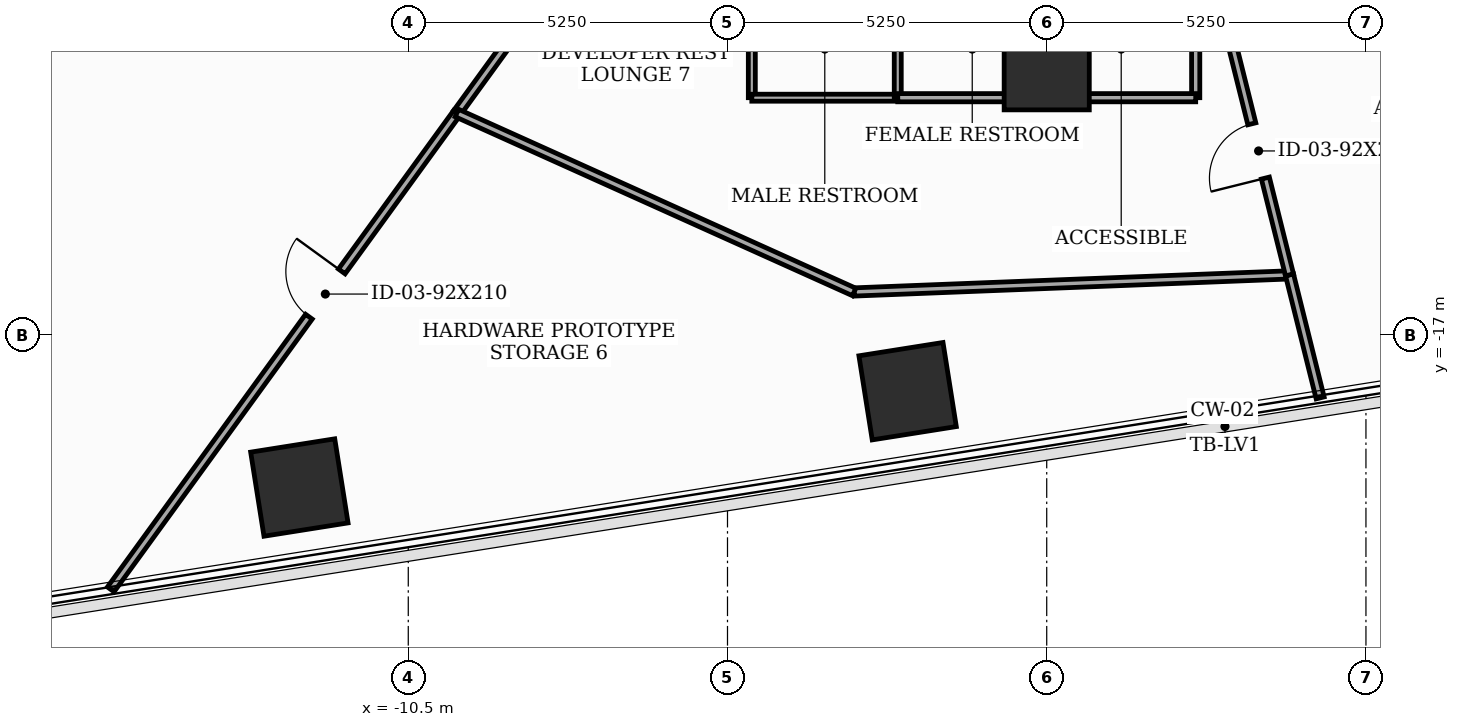
"""IFC4 building model, lengths in metres.
Left out: names, types, materials, properties, quantities, classifications, styles, units other than length and angle.
Written with IfcOpenShell. Run it as: python <this file> out.ifc"""

import sys

from ifc_helpers import new_model, si_unit, direction, frame, frame_2d, origin, origin_2d, place, context, subcontext, project, spatial, rectangle, extrude, element, fill, save


model = new_model("IFC4")
c1 = context("Model", 3, precision=1e-05, world=origin(), true_north=direction((0.0, 1.0)))
c2 = subcontext(c1, "Body", "Model", "MODEL_VIEW")
j1 = project(units=[si_unit("LENGTHUNIT", "METRE"), si_unit("PLANEANGLEUNIT", "RADIAN")], contexts=[c1])
p1 = place(None, origin())
s1 = spatial("IfcSite", under=j1, at=p1, CompositionType="ELEMENT")
p2 = place(p1, origin())
s2 = spatial("IfcBuilding", under=s1, at=p2, CompositionType="ELEMENT")
p3 = place(p2, frame((0.0, 0.0, 59.3)))
s3 = spatial("IfcBuildingStorey", under=s2, at=p3, CompositionType="ELEMENT", Elevation=59.3)
for number, where, z_axis, x_axis in (
    (1, (0.0, -12.6, 0.0), (0.0, 0.0, 1.0), (1.0, 0.0, 0.0)),
    (2, (-12.291, -19.511, 0.0), (0.0, 0.0, 1.0), (0.988, 0.156, 0.0)),
    (3, (-2.288, -17.927, 0.0), (0.0, 0.0, 1.0), (0.988, 0.156, 0.0)),
):
    element("IfcColumn", number, at=place(p3, frame(where, z_axis=z_axis, x_axis=x_axis)), inside=s3, PredefinedType="COLUMN", context=c2, shape_type="SweptSolid", body=[
        extrude(rectangle(XDim=1.4, YDim=1.4, at=origin_2d()), origin(), (0.0, 0.0, 1.0), 3.7),
    ])
p4 = place(p3, frame((-15.393, -21.187, 0.0), z_axis=(0.0, 0.0, 1.0), x_axis=(0.587736917223, 0.809052109653, 0.0)))
e4 = element("IfcWall", 4, at=p4, inside=s3, PredefinedType="PARTITIONING", context=c2, shape_type="SweptSolid", body=[
    extrude(rectangle(XDim=9.684, YDim=0.135, at=frame_2d((4.842, 0.0))), origin(), (0.0, 0.0, 1.0), 2.935),
])
p5 = place(p4, frame((5.544, 0.0, 0.0)))
e5 = element("IfcOpeningElement", 5, at=p5, cuts=e4, PredefinedType="OPENING", context=c2, shape_type="SweptSolid", body=[
    extrude(rectangle(XDim=0.92, YDim=2.1, at=frame_2d((0.46, 1.05))), frame((0.0, 0.077, 0.0), z_axis=(0.0, -1.0, 0.0), x_axis=(1.0, 0.0, 0.0)), (0.0, 0.0, 1.0), 0.155),
])
p6 = place(p3, frame((-9.701, -13.352, 0.0), z_axis=(0.0, 0.0, 1.0), x_axis=(0.587719574609, 0.809064707932, 0.0)))
e6 = element("IfcWall", 6, at=p6, inside=s3, PredefinedType="PARTITIONING", context=c2, shape_type="SweptSolid", body=[
    extrude(rectangle(XDim=3.34, YDim=0.135, at=frame_2d((1.67, 0.0))), origin(), (0.0, 0.0, 1.0), 3.5),
])
p7 = place(p3, frame((3.993, -16.014, 0.0), z_axis=(0.0, 0.0, 1.0), x_axis=(-0.999230720769, -0.039216918185, 0.0)))
e7 = element("IfcWall", 7, at=p7, inside=s3, PredefinedType="PARTITIONING", context=c2, shape_type="SweptSolid", body=[
    extrude(rectangle(XDim=7.166, YDim=0.135, at=frame_2d((3.583, 0.0))), origin(), (0.0, 0.0, 1.0), 2.785),
])
p8 = place(p3, frame((-3.167, -16.295, 0.0), z_axis=(0.0, 0.0, 1.0), x_axis=(-0.911785675506, 0.410666387645, 0.0)))
e8 = element("IfcWall", 8, at=p8, inside=s3, PredefinedType="PARTITIONING", context=c2, shape_type="SweptSolid", body=[
    extrude(rectangle(XDim=7.166, YDim=0.135, at=frame_2d((3.583, 0.0))), origin(), (0.0, 0.0, 1.0), 2.785),
])
p9 = place(p3, frame((4.497, -18.037, 0.0), z_axis=(0.0, 0.0, 1.0), x_axis=(-0.24157117672, 0.970383102995, 0.0)))
e9 = element("IfcWall", 9, at=p9, inside=s3, PredefinedType="PARTITIONING", context=c2, shape_type="SweptSolid", body=[
    extrude(rectangle(XDim=2.085, YDim=0.135, at=frame_2d((1.042, 0.0))), origin(), (0.0, 0.0, 1.0), 2.935),
])
p10 = place(p3, frame((-4.85, -10.65, 0.0), z_axis=(0.0, 0.0, 1.0), x_axis=(0.0, -1.0, 0.0)))
e10 = element("IfcWall", 10, at=p10, inside=s3, PredefinedType="PARTITIONING", context=c2, shape_type="SweptSolid", body=[
    extrude(rectangle(XDim=2.45, YDim=0.115, at=frame_2d((1.225, 0.0))), origin(), (0.0, 0.0, 1.0), 2.785),
])
p11 = place(p3, frame((-4.85, -13.1, 0.0), z_axis=(0.0, 0.0, 1.0), x_axis=(1.0, 0.0, 0.0)))
e11 = element("IfcWall", 11, at=p11, inside=s3, PredefinedType="PARTITIONING", context=c2, shape_type="SweptSolid", body=[
    extrude(rectangle(XDim=2.4, YDim=0.115, at=frame_2d((1.2, 0.0))), origin(), (0.0, 0.0, 1.0), 3.5),
])
p12 = place(p3, frame((-2.45, -13.1, 0.0), z_axis=(0.0, 0.0, 1.0), x_axis=(0.0, 1.0, 0.0)))
e12 = element("IfcWall", 12, at=p12, inside=s3, PredefinedType="PARTITIONING", context=c2, shape_type="SweptSolid", body=[
    extrude(rectangle(XDim=2.45, YDim=0.115, at=frame_2d((1.225, 0.0))), origin(), (0.0, 0.0, 1.0), 2.785),
])
p13 = place(p3, frame((0.0, -13.1, 0.0), z_axis=(0.0, 0.0, 1.0), x_axis=(-1.0, 0.0, 0.0)))
e13 = element("IfcWall", 13, at=p13, inside=s3, PredefinedType="PARTITIONING", context=c2, shape_type="SweptSolid", body=[
    extrude(rectangle(XDim=2.45, YDim=0.135, at=frame_2d((1.225, 0.0))), origin(), (0.0, 0.0, 1.0), 2.785),
])
p14 = place(p3, frame((2.45, -10.65, 0.0), z_axis=(0.0, 0.0, 1.0), x_axis=(0.0, -1.0, 0.0)))
e14 = element("IfcWall", 14, at=p14, inside=s3, PredefinedType="PARTITIONING", context=c2, shape_type="SweptSolid", body=[
    extrude(rectangle(XDim=2.45, YDim=0.135, at=frame_2d((1.225, 0.0))), origin(), (0.0, 0.0, 1.0), 2.785),
])
p15 = place(p3, frame((2.45, -13.1, 0.0), z_axis=(0.0, 0.0, 1.0), x_axis=(-1.0, 0.0, 0.0)))
e15 = element("IfcWall", 15, at=p15, inside=s3, PredefinedType="PARTITIONING", context=c2, shape_type="SweptSolid", body=[
    extrude(rectangle(XDim=2.45, YDim=0.135, at=frame_2d((1.225, 0.0))), origin(), (0.0, 0.0, 1.0), 2.785),
])
p16 = place(p3, frame((3.993, -16.014, 0.0), z_axis=(0.0, 0.0, 1.0), x_axis=(-0.242005649473, 0.97027484025, 0.0)))
e16 = element("IfcWall", 16, at=p16, inside=s3, PredefinedType="PARTITIONING", context=c2, shape_type="SweptSolid", body=[
    extrude(rectangle(XDim=5.528, YDim=0.135, at=frame_2d((2.764, 0.0))), origin(), (0.0, 0.0, 1.0), 2.785),
])
p17 = place(p16, frame((1.641, 0.0, 0.0)))
e17 = element("IfcOpeningElement", 17, at=p17, cuts=e16, PredefinedType="OPENING", context=c2, shape_type="SweptSolid", body=[
    extrude(rectangle(XDim=0.92, YDim=2.1, at=frame_2d((0.46, 1.05))), frame((0.0, 0.077, 0.0), z_axis=(0.0, -1.0, 0.0), x_axis=(1.0, 0.0, 0.0)), (0.0, 0.0, 1.0), 0.155),
])
p18 = place(p3, frame((0.0, -13.1, 0.0), z_axis=(0.0, 0.0, 1.0), x_axis=(0.0, 1.0, 0.0)))
e18 = element("IfcWall", 18, at=p18, inside=s3, PredefinedType="PARTITIONING", context=c2, shape_type="SweptSolid", body=[
    extrude(rectangle(XDim=2.45, YDim=0.115, at=frame_2d((1.225, 0.0))), origin(), (0.0, 0.0, 1.0), 2.785),
])
p19 = place(p5, origin())
e19 = element("IfcDoor", 19, at=p19, inside=s3, OperationType="SINGLE_SWING_RIGHT", PredefinedType="DOOR", context=c2, shape_type="SweptSolid", body=[
    extrude(rectangle(XDim=0.92, YDim=2.1, at=frame_2d((0.46, 1.05))), frame((0.0, 0.025, 0.0), z_axis=(0.0, -1.0, 0.0), x_axis=(1.0, 0.0, 0.0)), (0.0, 0.0, 1.0), 0.05),
])
fill(e5, e19)
p20 = place(p17, origin())
e20 = element("IfcDoor", 20, at=p20, inside=s3, OperationType="SINGLE_SWING_LEFT", PredefinedType="DOOR", context=c2, shape_type="SweptSolid", body=[
    extrude(rectangle(XDim=0.92, YDim=2.1, at=frame_2d((0.46, 1.05))), frame((0.0, 0.025, 0.0), z_axis=(0.0, -1.0, 0.0), x_axis=(1.0, 0.0, 0.0)), (0.0, 0.0, 1.0), 0.05),
])
fill(e17, e20)
save(model, sys.argv[1])
